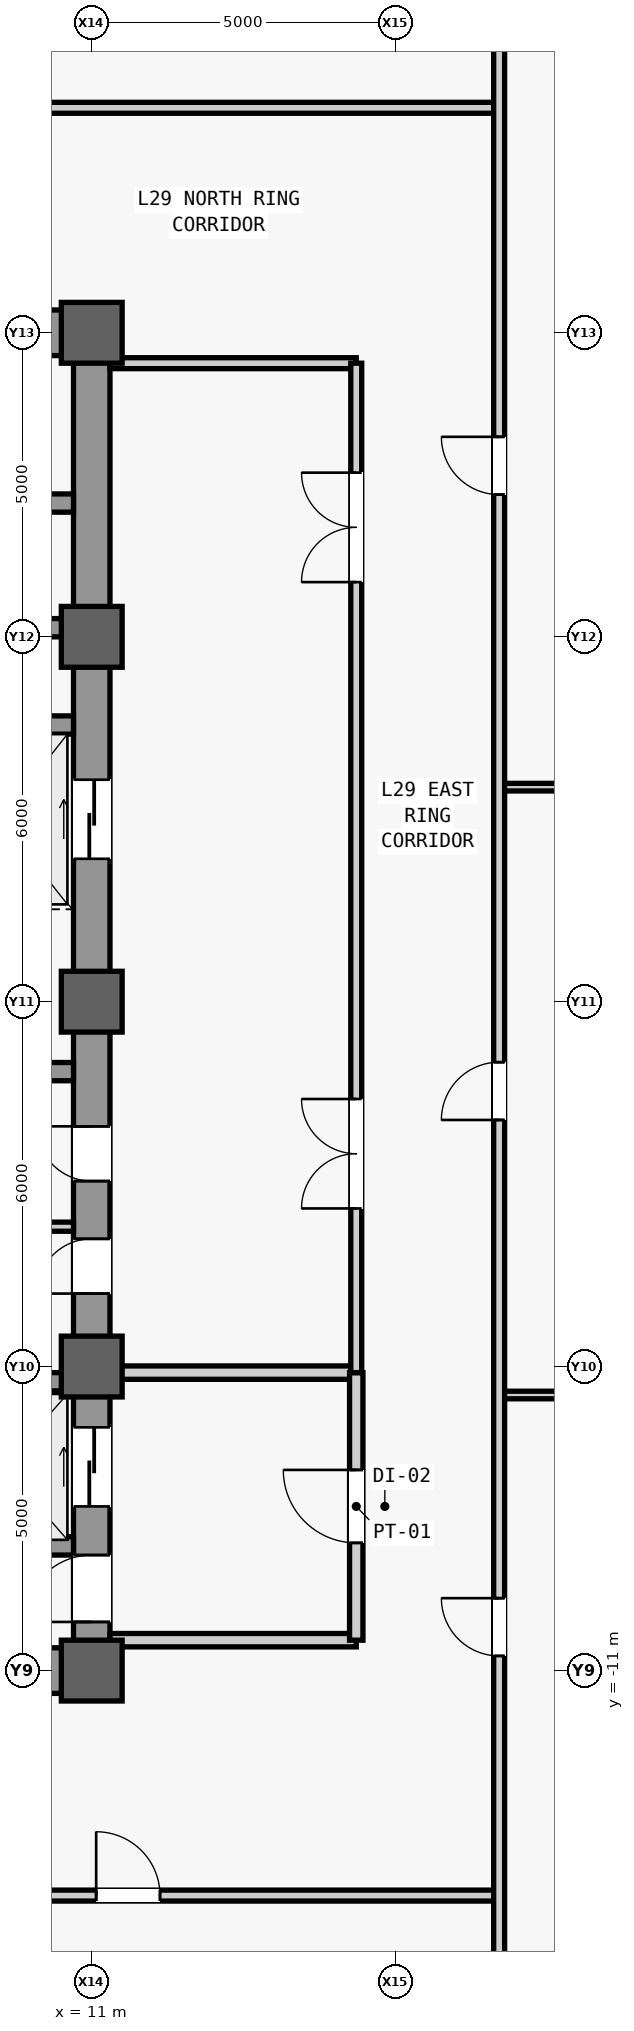
"""IFC4 building model, lengths in metres.
Left out: names, types, materials, properties, quantities, classifications, styles, units other than length and angle.
Written with IfcOpenShell. Run it as: python <this file> out.ifc"""

import sys

from ifc_helpers import new_model, si_unit, direction, frame, frame_2d, origin, origin_2d, place, context, subcontext, project, spatial, rectangle, extrude, source, transform, mapped, element, fill, save


model = new_model("IFC4")
c1 = context("Model", 3, precision=1e-05, world=origin(), true_north=direction((0.0, 1.0)))
c2 = subcontext(c1, "Body", "Model", "MODEL_VIEW")
j1 = project(units=[si_unit("LENGTHUNIT", "METRE"), si_unit("PLANEANGLEUNIT", "RADIAN")], contexts=[c1])
p1 = place(None, origin())
s1 = spatial("IfcSite", under=j1, at=p1, CompositionType="ELEMENT")
p2 = place(p1, origin())
s2 = spatial("IfcBuilding", under=s1, at=p2, CompositionType="ELEMENT")
p3 = place(p2, frame((0.0, 0.0, 128.3)))
s3 = spatial("IfcBuildingStorey", under=s2, at=p3, CompositionType="ELEMENT", Elevation=128.3)
m1 = source(origin(), c2, "Body", "SweptSolid", [
    extrude(rectangle(XDim=22.0, YDim=0.6, at=frame_2d((11.0, 0.0))), origin(), (0.0, 0.0, 1.0), 3.84),
])
p4 = place(p3, frame((11.0, -11.0, 0.0), z_axis=(0.0, 0.0, 1.0), x_axis=(0.0, 1.0, 0.0)))
e1 = element("IfcWall", 1, at=p4, inside=s3, PredefinedType="SHEAR", context=c2, shape_type="MappedRepresentation", body=[
    mapped(m1, transform((0.0, 0.0, 0.0), scale=1.0)),
])
m2 = source(origin(), c2, "Body", "SweptSolid", [
    extrude(rectangle(XDim=1.1, YDim=2.2, at=frame_2d((0.55, 1.1))), frame((0.0, 0.31, 0.0), z_axis=(0.0, -1.0, 0.0), x_axis=(1.0, 0.0, 0.0)), (0.0, 0.0, 1.0), 0.62),
])
p5 = place(p4, frame((0.8, 0.0, 0.0)))
e2 = element("IfcOpeningElement", 2, at=p5, cuts=e1, PredefinedType="OPENING", context=c2, shape_type="MappedRepresentation", body=[
    mapped(m2, transform((0.0, 0.0, 0.0), scale=1.0)),
])
m3 = source(origin(), c2, "Body", "SweptSolid", [
    extrude(rectangle(XDim=0.9, YDim=2.15, at=frame_2d((0.45, 1.075))), frame((0.0, 0.31, 0.0), z_axis=(0.0, -1.0, 0.0), x_axis=(1.0, 0.0, 0.0)), (0.0, 0.0, 1.0), 0.62),
])
p6 = place(p4, frame((6.2, 0.0, 0.0)))
e3 = element("IfcOpeningElement", 3, at=p6, cuts=e1, PredefinedType="OPENING", context=c2, shape_type="MappedRepresentation", body=[
    mapped(m3, transform((0.0, 0.0, 0.0), scale=1.0)),
])
p7 = place(p4, frame((8.05, 0.0, 0.0)))
e4 = element("IfcOpeningElement", 4, at=p7, cuts=e1, PredefinedType="OPENING", context=c2, shape_type="MappedRepresentation", body=[
    mapped(m3, transform((0.0, 0.0, 0.0), scale=1.0)),
])
m4 = source(origin(), c2, "Body", "SweptSolid", [
    extrude(rectangle(XDim=1.3, YDim=2.3, at=frame_2d((0.65, 1.15))), frame((0.0, 0.31, 0.0), z_axis=(0.0, -1.0, 0.0), x_axis=(1.0, 0.0, 0.0)), (0.0, 0.0, 1.0), 0.62),
])
p8 = place(p4, frame((2.7, 0.0, 0.0)))
e5 = element("IfcOpeningElement", 5, at=p8, cuts=e1, PredefinedType="OPENING", context=c2, shape_type="MappedRepresentation", body=[
    mapped(m4, transform((0.0, 0.0, 0.0), scale=1.0)),
])
p9 = place(p4, frame((13.35, 0.0, 0.0)))
e6 = element("IfcOpeningElement", 6, at=p9, cuts=e1, PredefinedType="OPENING", context=c2, shape_type="MappedRepresentation", body=[
    mapped(m4, transform((0.0, 0.0, 0.0), scale=1.0)),
])
m5 = source(origin(), c2, "Body", "SweptSolid", [
    extrude(rectangle(XDim=5.85, YDim=0.75, at=frame_2d((2.925, 0.0))), origin(), (0.0, 0.0, 1.0), 3.84),
])
p10 = place(p3, frame((4.85, -11.0, 0.0), z_axis=(0.0, 0.0, 1.0), x_axis=(1.0, 0.0, 0.0)))
e7 = element("IfcWall", 7, at=p10, inside=s3, PredefinedType="SHEAR", context=c2, shape_type="MappedRepresentation", body=[
    mapped(m5, transform((0.0, 0.0, 0.0), scale=1.0)),
])
p11 = place(p3, frame((4.85, 11.0, 0.0), z_axis=(0.0, 0.0, 1.0), x_axis=(1.0, 0.0, 0.0)))
e8 = element("IfcWall", 8, at=p11, inside=s3, PredefinedType="SHEAR", context=c2, shape_type="MappedRepresentation", body=[
    mapped(m5, transform((0.0, 0.0, 0.0), scale=1.0)),
])
m6 = source(origin(), c2, "Body", "SweptSolid", [
    extrude(rectangle(XDim=1.05, YDim=2.2, at=frame_2d((0.525, 1.1))), frame((0.0, 0.385, 0.0), z_axis=(0.0, -1.0, 0.0), x_axis=(1.0, 0.0, 0.0)), (0.0, 0.0, 1.0), 0.77),
])
p12 = place(p11, frame((1.375, 0.0, 0.0)))
e9 = element("IfcOpeningElement", 9, at=p12, cuts=e8, PredefinedType="OPENING", context=c2, shape_type="MappedRepresentation", body=[
    mapped(m6, transform((0.0, 0.0, 0.0), scale=1.0)),
])
m7 = source(origin(), c2, "Body", "SweptSolid", [
    extrude(rectangle(XDim=5.6, YDim=0.3, at=frame_2d((2.8, 0.0))), origin(), (0.0, 0.0, 1.0), 3.84),
])
p13 = place(p3, frame((5.1, -1.15, 0.0), z_axis=(0.0, 0.0, 1.0), x_axis=(1.0, 0.0, 0.0)))
e10 = element("IfcWall", 10, at=p13, inside=s3, PredefinedType="SHEAR", context=c2, shape_type="MappedRepresentation", body=[
    mapped(m7, transform((0.0, 0.0, 0.0), scale=1.0)),
])
m8 = source(origin(), c2, "Body", "SweptSolid", [
    extrude(rectangle(XDim=1.0, YDim=1.0, at=origin_2d()), origin(), (0.0, 0.0, 1.0), 4.1),
])
for number, where, z_axis, x_axis in (
    (11, (11.0, -11.0, 0.0), (0.0, 0.0, 1.0), (1.0, 0.0, 0.0)),
    (12, (11.0, -6.0, 0.0), (0.0, 0.0, 1.0), (1.0, 0.0, 0.0)),
    (13, (11.0, 0.0, 0.0), (0.0, 0.0, 1.0), (1.0, 0.0, 0.0)),
    (14, (11.0, 6.0, 0.0), (0.0, 0.0, 1.0), (1.0, 0.0, 0.0)),
    (15, (11.0, 11.0, 0.0), (0.0, 0.0, 1.0), (1.0, 0.0, 0.0)),
):
    element("IfcColumn", number, at=place(p3, frame(where, z_axis=z_axis, x_axis=x_axis)), inside=s3, PredefinedType="COLUMN", context=c2, shape_type="MappedRepresentation", body=[
        mapped(m8, transform((0.0, 0.0, 0.0), scale=1.0)),
    ])
m9 = source(origin(), c2, "Body", "SweptSolid", [
    extrude(rectangle(XDim=2.2, YDim=0.3, at=frame_2d((1.1, 0.0))), origin(), (0.0, 0.0, 1.0), 3.84),
])
for number, where, z_axis, x_axis in (
    (16, (8.5, -8.95, 0.0), (0.0, 0.0, 1.0), (1.0, 0.0, 0.0)),
    (17, (8.5, -6.25, 0.0), (0.0, 0.0, 1.0), (1.0, 0.0, 0.0)),
):
    element("IfcWall", number, at=place(p3, frame(where, z_axis=z_axis, x_axis=x_axis)), inside=s3, PredefinedType="SHEAR", context=c2, shape_type="MappedRepresentation", body=[
        mapped(m9, transform((0.0, 0.0, 0.0), scale=1.0)),
    ])
m10 = source(origin(), c2, "Body", "SweptSolid", [
    extrude(rectangle(XDim=2.3, YDim=0.3, at=frame_2d((1.15, 0.0))), origin(), (0.0, 0.0, 1.0), 3.84),
])
for number, where, z_axis, x_axis in (
    (18, (8.4, 4.55, 0.0), (0.0, 0.0, 1.0), (1.0, 0.0, 0.0)),
    (19, (8.4, 6.15, 0.0), (0.0, 0.0, 1.0), (1.0, 0.0, 0.0)),
    (20, (8.4, 8.2, 0.0), (0.0, 0.0, 1.0), (1.0, 0.0, 0.0)),
):
    element("IfcWall", number, at=place(p3, frame(where, z_axis=z_axis, x_axis=x_axis)), inside=s3, PredefinedType="SHEAR", context=c2, shape_type="MappedRepresentation", body=[
        mapped(m10, transform((0.0, 0.0, 0.0), scale=1.0)),
    ])
m11 = source(origin(), c2, "Body", "SweptSolid", [
    extrude(rectangle(XDim=2.05, YDim=0.15, at=frame_2d((1.025, 0.0))), origin(), (0.0, 0.0, 1.0), 3.84),
])
p14 = place(p3, frame((8.65, -3.7, 0.0), z_axis=(0.0, 0.0, 1.0), x_axis=(1.0, 0.0, 0.0)))
e21 = element("IfcWall", 21, at=p14, inside=s3, PredefinedType="PARTITIONING", context=c2, shape_type="MappedRepresentation", body=[
    mapped(m11, transform((0.0, 0.0, 0.0), scale=1.0)),
])
m12 = source(origin(), c2, "Body", "SweptSolid", [
    extrude(rectangle(XDim=4.05, YDim=0.22, at=frame_2d((2.025, 0.0))), origin(), (0.0, 0.0, 1.0), 3.84),
])
p15 = place(p3, frame((11.3, -10.5, 0.0), z_axis=(0.0, 0.0, 1.0), x_axis=(1.0, 0.0, 0.0)))
e22 = element("IfcWall", 22, at=p15, inside=s3, PredefinedType="PARTITIONING", context=c2, shape_type="MappedRepresentation", body=[
    mapped(m12, transform((0.0, 0.0, 0.0), scale=1.0)),
])
m13 = source(origin(), c2, "Body", "SweptSolid", [
    extrude(rectangle(XDim=4.05, YDim=0.22, at=frame_2d((2.025, 0.0))), origin(), (0.0, 0.0, 1.0), 3.067),
])
p16 = place(p3, frame((11.3, -6.1, 0.0), z_axis=(0.0, 0.0, 1.0), x_axis=(1.0, 0.0, 0.0)))
e23 = element("IfcWall", 23, at=p16, inside=s3, PredefinedType="PARTITIONING", context=c2, shape_type="MappedRepresentation", body=[
    mapped(m13, transform((0.0, 0.0, 0.0), scale=1.0)),
])
m14 = source(origin(), c2, "Body", "SweptSolid", [
    extrude(rectangle(XDim=4.4, YDim=0.22, at=frame_2d((2.2, 0.0))), origin(), (0.0, 0.0, 1.0), 3.84),
])
p17 = place(p3, frame((15.35, -10.5, 0.0), z_axis=(0.0, 0.0, 1.0), x_axis=(0.0, 1.0, 0.0)))
e24 = element("IfcWall", 24, at=p17, inside=s3, PredefinedType="PARTITIONING", context=c2, shape_type="MappedRepresentation", body=[
    mapped(m14, transform((0.0, 0.0, 0.0), scale=1.0)),
])
m15 = source(origin(), c2, "Body", "SweptSolid", [
    extrude(rectangle(XDim=1.2, YDim=2.2, at=frame_2d((0.6, 1.1))), frame((0.0, 0.12, 0.0), z_axis=(0.0, -1.0, 0.0), x_axis=(1.0, 0.0, 0.0)), (0.0, 0.0, 1.0), 0.24),
])
p18 = place(p17, frame((1.6, 0.0, 0.0)))
e25 = element("IfcOpeningElement", 25, at=p18, cuts=e24, PredefinedType="OPENING", context=c2, shape_type="MappedRepresentation", body=[
    mapped(m15, transform((0.0, 0.0, 0.0), scale=1.0)),
])
m16 = source(origin(), c2, "Body", "SweptSolid", [
    extrude(rectangle(XDim=4.05, YDim=0.18, at=frame_2d((2.025, 0.0))), origin(), (0.0, 0.0, 1.0), 3.84),
])
p19 = place(p3, frame((11.3, 10.5, 0.0), z_axis=(0.0, 0.0, 1.0), x_axis=(1.0, 0.0, 0.0)))
e26 = element("IfcWall", 26, at=p19, inside=s3, PredefinedType="PARTITIONING", context=c2, shape_type="MappedRepresentation", body=[
    mapped(m16, transform((0.0, 0.0, 0.0), scale=1.0)),
])
m17 = source(origin(), c2, "Body", "SweptSolid", [
    extrude(rectangle(XDim=16.6, YDim=0.18, at=frame_2d((8.3, 0.0))), origin(), (0.0, 0.0, 1.0), 3.84),
])
p20 = place(p3, frame((15.35, -6.1, 0.0), z_axis=(0.0, 0.0, 1.0), x_axis=(0.0, 1.0, 0.0)))
e27 = element("IfcWall", 27, at=p20, inside=s3, PredefinedType="PARTITIONING", context=c2, shape_type="MappedRepresentation", body=[
    mapped(m17, transform((0.0, 0.0, 0.0), scale=1.0)),
])
m18 = source(origin(), c2, "Body", "SweptSolid", [
    extrude(rectangle(XDim=1.8, YDim=2.25, at=frame_2d((0.9, 1.125))), frame((0.0, 0.1, 0.0), z_axis=(0.0, -1.0, 0.0), x_axis=(1.0, 0.0, 0.0)), (0.0, 0.0, 1.0), 0.2),
])
p21 = place(p20, frame((2.7, 0.0, 0.0)))
e28 = element("IfcOpeningElement", 28, at=p21, cuts=e27, PredefinedType="OPENING", context=c2, shape_type="MappedRepresentation", body=[
    mapped(m18, transform((0.0, 0.0, 0.0), scale=1.0)),
])
p22 = place(p20, frame((13.0, 0.0, 0.0)))
e29 = element("IfcOpeningElement", 29, at=p22, cuts=e27, PredefinedType="OPENING", context=c2, shape_type="MappedRepresentation", body=[
    mapped(m18, transform((0.0, 0.0, 0.0), scale=1.0)),
])
m19 = source(origin(), c2, "Body", "SweptSolid", [
    extrude(rectangle(XDim=37.1, YDim=0.18, at=frame_2d((18.55, 0.0))), origin(), (0.0, 0.0, 1.0), 3.84),
])
p23 = place(p3, frame((-19.4, -14.7, 0.0), z_axis=(0.0, 0.0, 1.0), x_axis=(1.0, 0.0, 0.0)))
e30 = element("IfcWall", 30, at=p23, inside=s3, PredefinedType="PARTITIONING", context=c2, shape_type="MappedRepresentation", body=[
    mapped(m19, transform((0.0, 0.0, 0.0), scale=1.0)),
])
m20 = source(origin(), c2, "Body", "SweptSolid", [
    extrude(rectangle(XDim=1.05, YDim=2.2, at=frame_2d((0.525, 1.1))), frame((0.0, 0.1, 0.0), z_axis=(0.0, -1.0, 0.0), x_axis=(1.0, 0.0, 0.0)), (0.0, 0.0, 1.0), 0.2),
])
p24 = place(p23, frame((6.056, 0.0, 0.0)))
e31 = element("IfcOpeningElement", 31, at=p24, cuts=e30, PredefinedType="OPENING", context=c2, shape_type="MappedRepresentation", body=[
    mapped(m20, transform((0.0, 0.0, 0.0), scale=1.0)),
])
p25 = place(p23, frame((12.46, 0.0, 0.0)))
e32 = element("IfcOpeningElement", 32, at=p25, cuts=e30, PredefinedType="OPENING", context=c2, shape_type="MappedRepresentation", body=[
    mapped(m20, transform((0.0, 0.0, 0.0), scale=1.0)),
])
p26 = place(p23, frame((22.477, 0.0, 0.0)))
e33 = element("IfcOpeningElement", 33, at=p26, cuts=e30, PredefinedType="OPENING", context=c2, shape_type="MappedRepresentation", body=[
    mapped(m20, transform((0.0, 0.0, 0.0), scale=1.0)),
])
p27 = place(p23, frame((30.473, 0.0, 0.0)))
e34 = element("IfcOpeningElement", 34, at=p27, cuts=e30, PredefinedType="OPENING", context=c2, shape_type="MappedRepresentation", body=[
    mapped(m20, transform((0.0, 0.0, 0.0), scale=1.0)),
])
p28 = place(p3, frame((-19.4, 14.7, 0.0), z_axis=(0.0, 0.0, 1.0), x_axis=(1.0, 0.0, 0.0)))
e35 = element("IfcWall", 35, at=p28, inside=s3, PredefinedType="PARTITIONING", context=c2, shape_type="MappedRepresentation", body=[
    mapped(m19, transform((0.0, 0.0, 0.0), scale=1.0)),
])
p29 = place(p28, frame((10.323, 0.0, 0.0)))
e36 = element("IfcOpeningElement", 36, at=p29, cuts=e35, PredefinedType="OPENING", context=c2, shape_type="MappedRepresentation", body=[
    mapped(m20, transform((0.0, 0.0, 0.0), scale=1.0)),
])
p30 = place(p28, frame((24.722, 0.0, 0.0)))
e37 = element("IfcOpeningElement", 37, at=p30, cuts=e35, PredefinedType="OPENING", context=c2, shape_type="MappedRepresentation", body=[
    mapped(m20, transform((0.0, 0.0, 0.0), scale=1.0)),
])
m21 = source(origin(), c2, "Body", "SweptSolid", [
    extrude(rectangle(XDim=14.3, YDim=0.125, at=frame_2d((7.15, 0.0))), origin(), (0.0, 0.0, 1.0), 3.84),
])
for number, where, z_axis, x_axis in (
    (38, (17.7, -6.468, 0.0), (0.0, 0.0, 1.0), (1.0, 0.0, 0.0)),
    (39, (17.7, 3.528, 0.0), (0.0, 0.0, 1.0), (1.0, 0.0, 0.0)),
):
    element("IfcWall", number, at=place(p3, frame(where, z_axis=z_axis, x_axis=x_axis)), inside=s3, PredefinedType="PARTITIONING", context=c2, shape_type="MappedRepresentation", body=[
        mapped(m21, transform((0.0, 0.0, 0.0), scale=1.0)),
    ])
m22 = source(origin(), c2, "Body", "SweptSolid", [
    extrude(rectangle(XDim=56.0, YDim=0.18, at=frame_2d((28.0, 0.0))), origin(), (0.0, 0.0, 1.0), 3.84),
])
p31 = place(p3, frame((17.7, -28.0, 0.0), z_axis=(0.0, 0.0, 1.0), x_axis=(0.0, 1.0, 0.0)))
e40 = element("IfcWall", 40, at=p31, inside=s3, PredefinedType="PARTITIONING", context=c2, shape_type="MappedRepresentation", body=[
    mapped(m22, transform((0.0, 0.0, 0.0), scale=1.0)),
])
m23 = source(origin(), c2, "Body", "SweptSolid", [
    extrude(rectangle(XDim=0.95, YDim=2.15, at=frame_2d((0.475, 1.075))), frame((0.0, 0.1, 0.0), z_axis=(0.0, -1.0, 0.0), x_axis=(1.0, 0.0, 0.0)), (0.0, 0.0, 1.0), 0.2),
])
p32 = place(p31, frame((17.241, 0.0, 0.0)))
e41 = element("IfcOpeningElement", 41, at=p32, cuts=e40, PredefinedType="OPENING", context=c2, shape_type="MappedRepresentation", body=[
    mapped(m23, transform((0.0, 0.0, 0.0), scale=1.0)),
])
p33 = place(p31, frame((26.055, 0.0, 0.0)))
e42 = element("IfcOpeningElement", 42, at=p33, cuts=e40, PredefinedType="OPENING", context=c2, shape_type="MappedRepresentation", body=[
    mapped(m23, transform((0.0, 0.0, 0.0), scale=1.0)),
])
p34 = place(p31, frame((36.339, 0.0, 0.0)))
e43 = element("IfcOpeningElement", 43, at=p34, cuts=e40, PredefinedType="OPENING", context=c2, shape_type="MappedRepresentation", body=[
    mapped(m23, transform((0.0, 0.0, 0.0), scale=1.0)),
])
m24 = source(origin(), c2, "Body", "SweptSolid", [
    extrude(rectangle(XDim=1.1, YDim=2.2, at=frame_2d((0.55, 1.1))), frame((0.0, 0.025, 0.0), z_axis=(0.0, -1.0, 0.0), x_axis=(1.0, 0.0, 0.0)), (0.0, 0.0, 1.0), 0.05),
])
p35 = place(p5, origin())
e44 = element("IfcDoor", 44, at=p35, inside=s3, OperationType="SINGLE_SWING_LEFT", PredefinedType="DOOR", context=c2, shape_type="MappedRepresentation", body=[
    mapped(m24, transform((0.0, 0.0, 0.0), scale=1.0)),
])
fill(e2, e44)
m25 = source(origin(), c2, "Body", "SweptSolid", [
    extrude(rectangle(XDim=0.9, YDim=2.15, at=frame_2d((0.45, 1.075))), frame((0.0, 0.025, 0.0), z_axis=(0.0, -1.0, 0.0), x_axis=(1.0, 0.0, 0.0)), (0.0, 0.0, 1.0), 0.05),
])
p36 = place(p6, origin())
e45 = element("IfcDoor", 45, at=p36, inside=s3, OperationType="SINGLE_SWING_LEFT", PredefinedType="DOOR", context=c2, shape_type="MappedRepresentation", body=[
    mapped(m25, transform((0.0, 0.0, 0.0), scale=1.0)),
])
fill(e3, e45)
p37 = place(p7, origin())
e46 = element("IfcDoor", 46, at=p37, inside=s3, OperationType="SINGLE_SWING_RIGHT", PredefinedType="DOOR", context=c2, shape_type="MappedRepresentation", body=[
    mapped(m25, transform((0.0, 0.0, 0.0), scale=1.0)),
])
fill(e4, e46)
m26 = source(origin(), c2, "Body", "SweptSolid", [
    extrude(rectangle(XDim=1.2, YDim=2.2, at=frame_2d((0.6, 1.1))), frame((0.0, 0.025, 0.0), z_axis=(0.0, -1.0, 0.0), x_axis=(1.0, 0.0, 0.0)), (0.0, 0.0, 1.0), 0.05),
])
p38 = place(p18, origin())
e47 = element("IfcDoor", 47, at=p38, inside=s3, OperationType="SINGLE_SWING_RIGHT", PredefinedType="DOOR", context=c2, shape_type="MappedRepresentation", body=[
    mapped(m26, transform((0.0, 0.0, 0.0), scale=1.0)),
])
fill(e25, e47)
m27 = source(origin(), c2, "Body", "SweptSolid", [
    extrude(rectangle(XDim=1.8, YDim=2.25, at=frame_2d((0.9, 1.125))), frame((0.0, 0.025, 0.0), z_axis=(0.0, -1.0, 0.0), x_axis=(1.0, 0.0, 0.0)), (0.0, 0.0, 1.0), 0.05),
])
p39 = place(p21, origin())
e48 = element("IfcDoor", 48, at=p39, inside=s3, OperationType="SINGLE_SWING_RIGHT", PredefinedType="DOOR", context=c2, shape_type="MappedRepresentation", body=[
    mapped(m27, transform((0.0, 0.0, 0.0), scale=1.0)),
])
fill(e28, e48)
p40 = place(p22, origin())
e49 = element("IfcDoor", 49, at=p40, inside=s3, OperationType="SINGLE_SWING_LEFT", PredefinedType="DOOR", context=c2, shape_type="MappedRepresentation", body=[
    mapped(m27, transform((0.0, 0.0, 0.0), scale=1.0)),
])
fill(e29, e49)
m28 = source(origin(), c2, "Body", "SweptSolid", [
    extrude(rectangle(XDim=1.05, YDim=2.2, at=frame_2d((0.525, 1.1))), frame((0.0, 0.025, 0.0), z_axis=(0.0, -1.0, 0.0), x_axis=(1.0, 0.0, 0.0)), (0.0, 0.0, 1.0), 0.05),
])
p41 = place(p27, origin())
e50 = element("IfcDoor", 50, at=p41, inside=s3, OperationType="SINGLE_SWING_LEFT", PredefinedType="DOOR", context=c2, shape_type="MappedRepresentation", body=[
    mapped(m28, transform((0.0, 0.0, 0.0), scale=1.0)),
])
fill(e34, e50)
m29 = source(origin(), c2, "Body", "SweptSolid", [
    extrude(rectangle(XDim=0.95, YDim=2.15, at=frame_2d((0.475, 1.075))), frame((0.0, 0.025, 0.0), z_axis=(0.0, -1.0, 0.0), x_axis=(1.0, 0.0, 0.0)), (0.0, 0.0, 1.0), 0.05),
])
p42 = place(p32, origin())
e51 = element("IfcDoor", 51, at=p42, inside=s3, OperationType="SINGLE_SWING_RIGHT", PredefinedType="DOOR", context=c2, shape_type="MappedRepresentation", body=[
    mapped(m29, transform((0.0, 0.0, 0.0), scale=1.0)),
])
fill(e41, e51)
p43 = place(p33, origin())
e52 = element("IfcDoor", 52, at=p43, inside=s3, OperationType="SINGLE_SWING_LEFT", PredefinedType="DOOR", context=c2, shape_type="MappedRepresentation", body=[
    mapped(m29, transform((0.0, 0.0, 0.0), scale=1.0)),
])
fill(e42, e52)
p44 = place(p34, origin())
e53 = element("IfcDoor", 53, at=p44, inside=s3, OperationType="SINGLE_SWING_RIGHT", PredefinedType="DOOR", context=c2, shape_type="MappedRepresentation", body=[
    mapped(m29, transform((0.0, 0.0, 0.0), scale=1.0)),
])
fill(e43, e53)
m30 = source(origin(), c2, "Body", "SweptSolid", [
    extrude(rectangle(XDim=1.3, YDim=2.3, at=frame_2d((0.65, 1.15))), frame((0.0, 0.025, 0.0), z_axis=(0.0, -1.0, 0.0), x_axis=(1.0, 0.0, 0.0)), (0.0, 0.0, 1.0), 0.05),
])
p45 = place(p8, origin())
e54 = element("IfcDoor", 54, at=p45, inside=s3, OperationType="SLIDING_TO_LEFT", PredefinedType="DOOR", context=c2, shape_type="MappedRepresentation", body=[
    mapped(m30, transform((0.0, 0.0, 0.0), scale=1.0)),
])
fill(e5, e54)
p46 = place(p9, origin())
e55 = element("IfcDoor", 55, at=p46, inside=s3, OperationType="SLIDING_TO_LEFT", PredefinedType="DOOR", context=c2, shape_type="MappedRepresentation", body=[
    mapped(m30, transform((0.0, 0.0, 0.0), scale=1.0)),
])
fill(e6, e55)
save(model, sys.argv[1])
